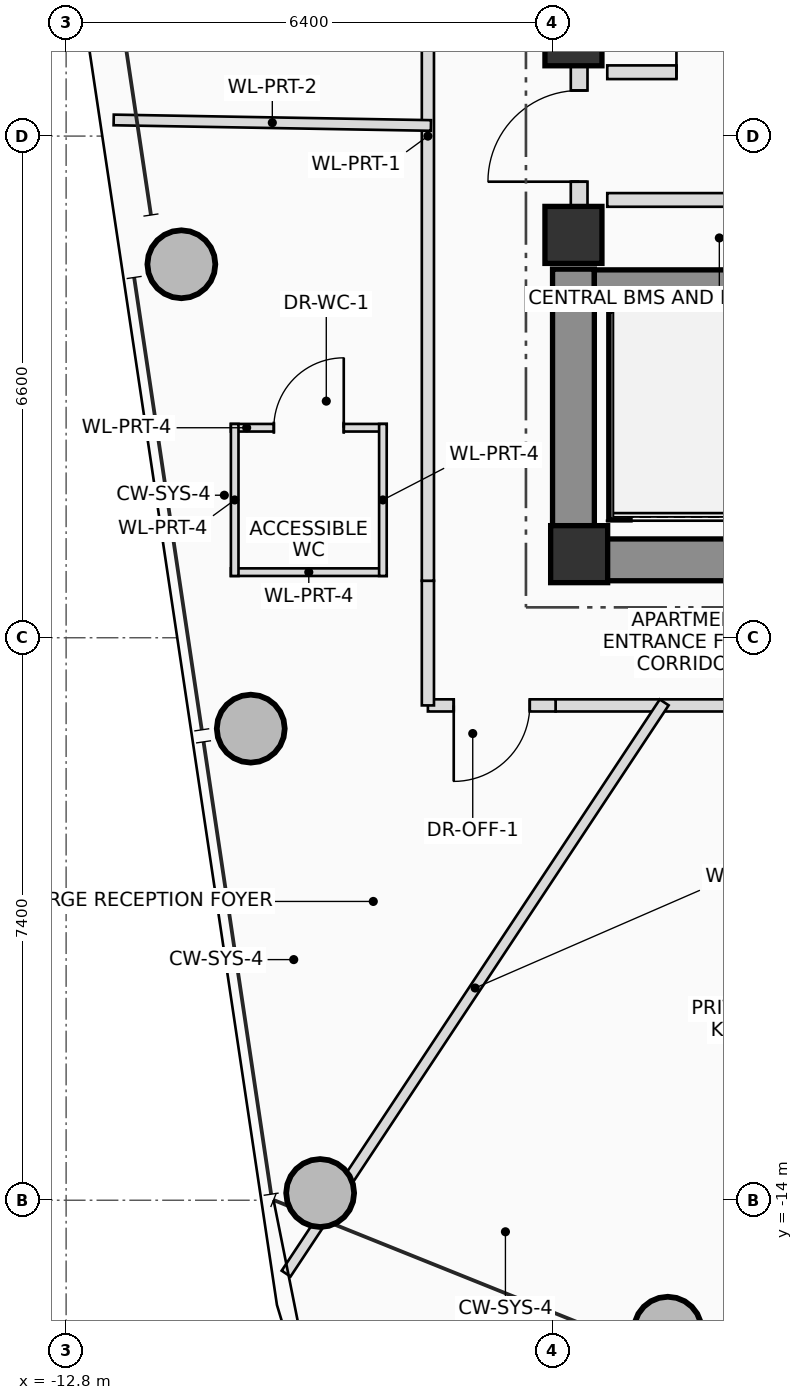
"""IFC4 building model, lengths in metres.
Left out: names, types, materials, properties, quantities, classifications, styles, units other than length and angle.
Written with IfcOpenShell. Run it as: python <this file> out.ifc"""

import sys

from ifc_helpers import new_model, si_unit, direction, frame, frame_2d, origin, origin_2d, place, context, subcontext, project, spatial, rectangle, hollow_circle, extrude, source, transform, mapped, element, fill, save


model = new_model("IFC4")
c1 = context("Model", 3, precision=1e-05, world=origin(), true_north=direction((0.0, 1.0)))
c2 = subcontext(c1, "Body", "Model", "MODEL_VIEW")
j1 = project(units=[si_unit("LENGTHUNIT", "METRE"), si_unit("PLANEANGLEUNIT", "RADIAN")], contexts=[c1])
p1 = place(None, origin())
s1 = spatial("IfcSite", under=j1, at=p1, CompositionType="ELEMENT")
p2 = place(p1, origin())
s2 = spatial("IfcBuilding", under=s1, at=p2, CompositionType="ELEMENT")
p3 = place(p2, frame((0.0, 0.0, 277.95)))
s3 = spatial("IfcBuildingStorey", under=s2, at=p3, CompositionType="ELEMENT", Elevation=277.95)
m1 = source(origin(), c2, "Body", "SweptSolid", [
    extrude(rectangle(XDim=0.75, YDim=0.75, at=origin_2d()), origin(), (0.0, 0.0, 1.0), 3.4),
])
p4 = place(p3, frame((-6.05, -5.5, 0.0), z_axis=(0.0, 0.0, 1.0), x_axis=(1.0, 0.0, 0.0)))
e1 = element("IfcColumn", 1, at=p4, inside=s3, PredefinedType="COLUMN", context=c2, shape_type="MappedRepresentation", body=[
    mapped(m1, transform((0.0, 0.0, 0.0), scale=1.0)),
])
p5 = place(p3, frame((-6.4, -5.575, 0.0), z_axis=(0.0, 0.0, 1.0), x_axis=(1.0, 0.0, 0.0)))
e2 = element("IfcWall", 2, at=p5, inside=s3, PredefinedType="SHEAR", context=c2, shape_type="SweptSolid", body=[
    extrude(rectangle(XDim=12.8, YDim=0.55, at=frame_2d((6.4, 0.0))), origin(), (0.0, 0.0, 1.0), 3.4),
])
p6 = place(p5, frame((8.6, 0.0, 0.0)))
e3 = element("IfcOpeningElement", 3, at=p6, cuts=e2, PredefinedType="OPENING", context=c2, shape_type="SweptSolid", body=[
    extrude(rectangle(XDim=1.2, YDim=2.2, at=frame_2d((0.6, 1.1))), frame((0.0, 0.285, 0.0), z_axis=(0.0, -1.0, 0.0), x_axis=(1.0, 0.0, 0.0)), (0.0, 0.0, 1.0), 0.57),
])
p7 = place(p3, frame((-6.125, -5.3, 0.0), z_axis=(0.0, 0.0, 1.0), x_axis=(0.0, 1.0, 0.0)))
e4 = element("IfcWall", 4, at=p7, inside=s3, PredefinedType="SHEAR", context=c2, shape_type="SweptSolid", body=[
    extrude(rectangle(XDim=3.55, YDim=0.55, at=frame_2d((1.775, 0.0))), origin(), (0.0, 0.0, 1.0), 3.4),
])
p8 = place(p3, frame((-5.85, -1.94, 0.0), z_axis=(0.0, 0.0, 1.0), x_axis=(1.0, 0.0, 0.0)))
e5 = element("IfcWall", 5, at=p8, inside=s3, PredefinedType="SHEAR", context=c2, shape_type="SweptSolid", body=[
    extrude(rectangle(XDim=11.7, YDim=0.36, at=frame_2d((5.85, 0.0))), origin(), (0.0, 0.0, 1.0), 3.4),
])
p9 = place(p3, frame((-5.52, -5.05, 0.0), z_axis=(0.0, 0.0, 1.0), x_axis=(0.0, 1.0, 0.0)))
e6 = element("IfcWall", 6, at=p9, inside=s3, PredefinedType="SHEAR", context=c2, shape_type="SweptSolid", body=[
    extrude(rectangle(XDim=2.75, YDim=0.28, at=frame_2d((1.375, 0.0))), origin(), (0.0, 0.0, 1.0), 3.4),
])
for number, where, z_axis, x_axis in (
    (7, (-6.125, -1.3, 0.0), (0.0, 0.0, 1.0), (1.0, 0.0, 0.0)),
    (8, (-6.125, 1.3, 0.0), (0.0, 0.0, 1.0), (1.0, 0.0, 0.0)),
):
    element("IfcColumn", number, at=place(p3, frame(where, z_axis=z_axis, x_axis=x_axis)), inside=s3, PredefinedType="COLUMN", context=c2, shape_type="MappedRepresentation", body=[
        mapped(m1, transform((0.0, 0.0, 0.0), scale=1.0)),
    ])
m2 = source(origin(), c2, "Body", "SweptSolid", [
    extrude(hollow_circle(Radius=0.45, WallThickness=0.032, at=origin_2d()), origin(), (0.0, 0.0, 1.0), 3.4),
])
for number, where, z_axis, x_axis in (
    (9, (-4.884, -15.717, 0.0), (0.0, 0.0, 1.0), (1.0, 0.0, 0.0)),
    (10, (-11.284, -1.686, 0.0), (0.0, 0.0, 1.0), (1.0, 0.0, 0.0)),
    (11, (-10.371, -7.796, 0.0), (0.0, 0.0, 1.0), (1.0, 0.0, 0.0)),
    (12, (-9.458, -13.905, 0.0), (0.0, 0.0, 1.0), (1.0, 0.0, 0.0)),
):
    element("IfcColumn", number, at=place(p3, frame(where, z_axis=z_axis, x_axis=x_axis)), inside=s3, PredefinedType="COLUMN", context=c2, shape_type="MappedRepresentation", body=[
        mapped(m2, transform((0.0, 0.0, 0.0), scale=1.0)),
    ])
p10 = place(p3, frame((-6.05, -0.95, 0.0), z_axis=(0.0, 0.0, 1.0), x_axis=(0.0, 1.0, 0.0)))
e13 = element("IfcWall", 13, at=p10, inside=s3, PredefinedType="PLUMBINGWALL", context=c2, shape_type="SweptSolid", body=[
    extrude(rectangle(XDim=1.9, YDim=0.22, at=frame_2d((0.95, 0.0))), origin(), (0.0, 0.0, 1.0), 2.18),
])
p11 = place(p10, frame((0.35, 0.0, 0.0)))
e14 = element("IfcOpeningElement", 14, at=p11, cuts=e13, PredefinedType="OPENING", context=c2, shape_type="SweptSolid", body=[
    extrude(rectangle(XDim=1.2, YDim=2.2, at=frame_2d((0.6, 1.1))), frame((0.0, 0.12, 0.0), z_axis=(0.0, -1.0, 0.0), x_axis=(1.0, 0.0, 0.0)), (0.0, 0.0, 1.0), 0.24),
])
p12 = place(p3, frame((-5.68, 0.84, 0.0), z_axis=(0.0, 0.0, 1.0), x_axis=(1.0, 0.0, 0.0)))
e15 = element("IfcWall", 15, at=p12, inside=s3, PredefinedType="PLUMBINGWALL", context=c2, shape_type="SweptSolid", body=[
    extrude(rectangle(XDim=10.26, YDim=0.18, at=frame_2d((5.13, 0.0))), origin(), (0.0, 0.0, 1.0), 3.2),
])
p13 = place(p12, frame((0.91, 0.0, 0.0)))
e16 = element("IfcOpeningElement", 16, at=p13, cuts=e15, PredefinedType="OPENING", context=c2, shape_type="SweptSolid", body=[
    extrude(rectangle(XDim=0.9, YDim=2.05, at=frame_2d((0.45, 1.025))), frame((0.0, 0.1, 0.0), z_axis=(0.0, -1.0, 0.0), x_axis=(1.0, 0.0, 0.0)), (0.0, 0.0, 1.0), 0.2),
])
p14 = place(p12, frame((4.38, 0.0, 0.0)))
e17 = element("IfcOpeningElement", 17, at=p14, cuts=e15, PredefinedType="OPENING", context=c2, shape_type="SweptSolid", body=[
    extrude(rectangle(XDim=0.9, YDim=2.05, at=frame_2d((0.45, 1.025))), frame((0.0, 0.1, 0.0), z_axis=(0.0, -1.0, 0.0), x_axis=(1.0, 0.0, 0.0)), (0.0, 0.0, 1.0), 0.2),
])
p15 = place(p12, frame((7.33, 0.0, 0.0)))
e18 = element("IfcOpeningElement", 18, at=p15, cuts=e15, PredefinedType="OPENING", context=c2, shape_type="SweptSolid", body=[
    extrude(rectangle(XDim=1.1, YDim=2.2, at=frame_2d((0.55, 1.1))), frame((0.0, 0.1, 0.0), z_axis=(0.0, -1.0, 0.0), x_axis=(1.0, 0.0, 0.0)), (0.0, 0.0, 1.0), 0.2),
])
p16 = place(p12, frame((8.83, 0.0, 0.0)))
e19 = element("IfcOpeningElement", 19, at=p16, cuts=e15, PredefinedType="OPENING", context=c2, shape_type="SweptSolid", body=[
    extrude(rectangle(XDim=1.1, YDim=2.2, at=frame_2d((0.55, 1.1))), frame((0.0, 0.1, 0.0), z_axis=(0.0, -1.0, 0.0), x_axis=(1.0, 0.0, 0.0)), (0.0, 0.0, 1.0), 0.2),
])
p17 = place(p3, frame((-5.68, -0.84, 0.0), z_axis=(0.0, 0.0, 1.0), x_axis=(1.0, 0.0, 0.0)))
e20 = element("IfcWall", 20, at=p17, inside=s3, PredefinedType="PLUMBINGWALL", context=c2, shape_type="SweptSolid", body=[
    extrude(rectangle(XDim=8.7, YDim=0.18, at=frame_2d((4.35, 0.0))), origin(), (0.0, 0.0, 1.0), 3.2),
])
p18 = place(p17, frame((3.13, 0.0, 0.0)))
e21 = element("IfcOpeningElement", 21, at=p18, cuts=e20, PredefinedType="OPENING", context=c2, shape_type="SweptSolid", body=[
    extrude(rectangle(XDim=0.9, YDim=2.05, at=frame_2d((0.45, 1.025))), frame((0.0, 0.1, 0.0), z_axis=(0.0, -1.0, 0.0), x_axis=(1.0, 0.0, 0.0)), (0.0, 0.0, 1.0), 0.2),
])
p19 = place(p17, frame((7.33, 0.0, 0.0)))
e22 = element("IfcOpeningElement", 22, at=p19, cuts=e20, PredefinedType="OPENING", context=c2, shape_type="SweptSolid", body=[
    extrude(rectangle(XDim=1.1, YDim=2.2, at=frame_2d((0.55, 1.1))), frame((0.0, 0.1, 0.0), z_axis=(0.0, -1.0, 0.0), x_axis=(1.0, 0.0, 0.0)), (0.0, 0.0, 1.0), 0.2),
])
p20 = place(p3, frame((-10.632, -3.837, 0.0), z_axis=(0.0, 0.0, 1.0), x_axis=(1.0, 0.0, 0.0)))
e23 = element("IfcWall", 23, at=p20, inside=s3, PredefinedType="PARTITIONING", context=c2, shape_type="SweptSolid", body=[
    extrude(rectangle(XDim=2.05, YDim=0.1, at=frame_2d((1.025, 0.0))), origin(), (0.0, 0.0, 1.0), 2.805),
])
p21 = place(p20, frame((0.565, 0.0, 0.0)))
e24 = element("IfcOpeningElement", 24, at=p21, cuts=e23, PredefinedType="OPENING", context=c2, shape_type="SweptSolid", body=[
    extrude(rectangle(XDim=0.92, YDim=2.1, at=frame_2d((0.46, 1.05))), frame((0.0, 0.06, 0.0), z_axis=(0.0, -1.0, 0.0), x_axis=(1.0, 0.0, 0.0)), (0.0, 0.0, 1.0), 0.12),
])
p22 = place(p3, frame((-8.582, -5.737, 0.0), z_axis=(0.0, 0.0, 1.0), x_axis=(-1.0, 0.0, 0.0)))
e25 = element("IfcWall", 25, at=p22, inside=s3, PredefinedType="PARTITIONING", context=c2, shape_type="SweptSolid", body=[
    extrude(rectangle(XDim=2.05, YDim=0.1, at=frame_2d((1.025, 0.0))), origin(), (0.0, 0.0, 1.0), 2.765),
])
p23 = place(p3, frame((-8.632, -3.787, 0.0), z_axis=(0.0, 0.0, 1.0), x_axis=(0.0, -1.0, 0.0)))
e26 = element("IfcWall", 26, at=p23, inside=s3, PredefinedType="PARTITIONING", context=c2, shape_type="SweptSolid", body=[
    extrude(rectangle(XDim=2.0, YDim=0.1, at=frame_2d((1.0, 0.0))), origin(), (0.0, 0.0, 1.0), 2.805),
])
p24 = place(p3, frame((-10.582, -5.787, 0.0), z_axis=(0.0, 0.0, 1.0), x_axis=(0.0, 1.0, 0.0)))
e27 = element("IfcWall", 27, at=p24, inside=s3, PredefinedType="PARTITIONING", context=c2, shape_type="SweptSolid", body=[
    extrude(rectangle(XDim=2.0, YDim=0.1, at=frame_2d((1.0, 0.0))), origin(), (0.0, 0.0, 1.0), 2.765),
])
p25 = place(p3, frame((3.45, -7.49, 0.0), z_axis=(0.0, 0.0, 1.0), x_axis=(-1.0, 0.0, 0.0)))
e28 = element("IfcWall", 28, at=p25, inside=s3, PredefinedType="PARTITIONING", context=c2, shape_type="SweptSolid", body=[
    extrude(rectangle(XDim=9.81, YDim=0.16, at=frame_2d((4.905, 0.0))), origin(), (0.0, 0.0, 1.0), 2.605),
])
p26 = place(p25, frame((4.923, 0.0, 0.0)))
e29 = element("IfcOpeningElement", 29, at=p26, cuts=e28, PredefinedType="OPENING", context=c2, shape_type="SweptSolid", body=[
    extrude(rectangle(XDim=1.0, YDim=2.25, at=frame_2d((0.5, 1.125))), frame((0.0, 0.09, 0.0), z_axis=(0.0, -1.0, 0.0), x_axis=(1.0, 0.0, 0.0)), (0.0, 0.0, 1.0), 0.18),
])
p27 = place(p3, frame((-6.36, -7.49, 0.0), z_axis=(0.0, 0.0, 1.0), x_axis=(-1.0, 0.0, 0.0)))
e30 = element("IfcWall", 30, at=p27, inside=s3, PredefinedType="PARTITIONING", context=c2, shape_type="SweptSolid", body=[
    extrude(rectangle(XDim=1.68, YDim=0.16, at=frame_2d((0.84, 0.0))), origin(), (0.0, 0.0, 1.0), 2.605),
])
p28 = place(p27, frame((0.34, 0.0, 0.0)))
e31 = element("IfcOpeningElement", 31, at=p28, cuts=e30, PredefinedType="OPENING", context=c2, shape_type="SweptSolid", body=[
    extrude(rectangle(XDim=1.0, YDim=2.25, at=frame_2d((0.5, 1.125))), frame((0.0, 0.09, 0.0), z_axis=(0.0, -1.0, 0.0), x_axis=(1.0, 0.0, 0.0)), (0.0, 0.0, 1.0), 0.18),
])
p29 = place(p3, frame((-8.04, -7.49, 0.0), z_axis=(0.0, 0.0, 1.0), x_axis=(0.0, 1.0, 0.0)))
e32 = element("IfcWall", 32, at=p29, inside=s3, PredefinedType="PARTITIONING", context=c2, shape_type="SweptSolid", body=[
    extrude(rectangle(XDim=1.64, YDim=0.16, at=frame_2d((0.82, 0.0))), origin(), (0.0, 0.0, 1.0), 2.605),
])
p30 = place(p3, frame((-8.04, -5.85, 0.0), z_axis=(0.0, 0.0, 1.0), x_axis=(0.0, 1.0, 0.0)))
e33 = element("IfcWall", 33, at=p30, inside=s3, PredefinedType="PARTITIONING", context=c2, shape_type="SweptSolid", body=[
    extrude(rectangle(XDim=11.7, YDim=0.16, at=frame_2d((5.85, 0.0))), origin(), (0.0, 0.0, 1.0), 2.605),
])
p31 = place(p3, frame((-8.0, 0.14, 0.0), z_axis=(0.0, 0.0, 1.0), x_axis=(-0.999848132876, 0.017427311435, 0.0)))
e34 = element("IfcWall", 34, at=p31, inside=s3, PredefinedType="PARTITIONING", context=c2, shape_type="SweptSolid", body=[
    extrude(rectangle(XDim=4.175, YDim=0.14, at=frame_2d((2.087, 0.0))), origin(), (0.0, 0.0, 1.0), 2.765),
])
p32 = place(p3, frame((-4.931, -7.45, 0.0), z_axis=(0.0, 0.0, 1.0), x_axis=(-0.551953051788, -0.833875187676, 0.0)))
e35 = element("IfcWall", 35, at=p32, inside=s3, PredefinedType="PARTITIONING", context=c2, shape_type="SweptSolid", body=[
    extrude(rectangle(XDim=9.013, YDim=0.14, at=frame_2d((4.507, 0.0))), origin(), (0.0, 0.0, 1.0), 2.605),
])
p33 = place(p11, origin())
e36 = element("IfcDoor", 36, at=p33, inside=s3, OperationType="SINGLE_SWING_LEFT", PredefinedType="DOOR", context=c2, shape_type="SweptSolid", body=[
    extrude(rectangle(XDim=1.2, YDim=2.2, at=frame_2d((0.6, 1.1))), frame((0.0, 0.025, 0.0), z_axis=(0.0, -1.0, 0.0), x_axis=(1.0, 0.0, 0.0)), (0.0, 0.0, 1.0), 0.05),
])
fill(e14, e36)
p34 = place(p13, origin())
e37 = element("IfcDoor", 37, at=p34, inside=s3, OperationType="SINGLE_SWING_LEFT", PredefinedType="DOOR", context=c2, shape_type="SweptSolid", body=[
    extrude(rectangle(XDim=0.9, YDim=2.05, at=frame_2d((0.45, 1.025))), frame((0.0, 0.025, 0.0), z_axis=(0.0, -1.0, 0.0), x_axis=(1.0, 0.0, 0.0)), (0.0, 0.0, 1.0), 0.05),
])
fill(e16, e37)
p35 = place(p21, origin())
e38 = element("IfcDoor", 38, at=p35, inside=s3, OperationType="SINGLE_SWING_RIGHT", PredefinedType="DOOR", context=c2, shape_type="SweptSolid", body=[
    extrude(rectangle(XDim=0.92, YDim=2.1, at=frame_2d((0.46, 1.05))), frame((0.0, 0.025, 0.0), z_axis=(0.0, -1.0, 0.0), x_axis=(1.0, 0.0, 0.0)), (0.0, 0.0, 1.0), 0.05),
])
fill(e24, e38)
p36 = place(p28, origin())
e39 = element("IfcDoor", 39, at=p36, inside=s3, OperationType="SINGLE_SWING_RIGHT", PredefinedType="DOOR", context=c2, shape_type="SweptSolid", body=[
    extrude(rectangle(XDim=1.0, YDim=2.25, at=frame_2d((0.5, 1.125))), frame((0.0, 0.025, 0.0), z_axis=(0.0, -1.0, 0.0), x_axis=(1.0, 0.0, 0.0)), (0.0, 0.0, 1.0), 0.05),
])
fill(e31, e39)
save(model, sys.argv[1])
